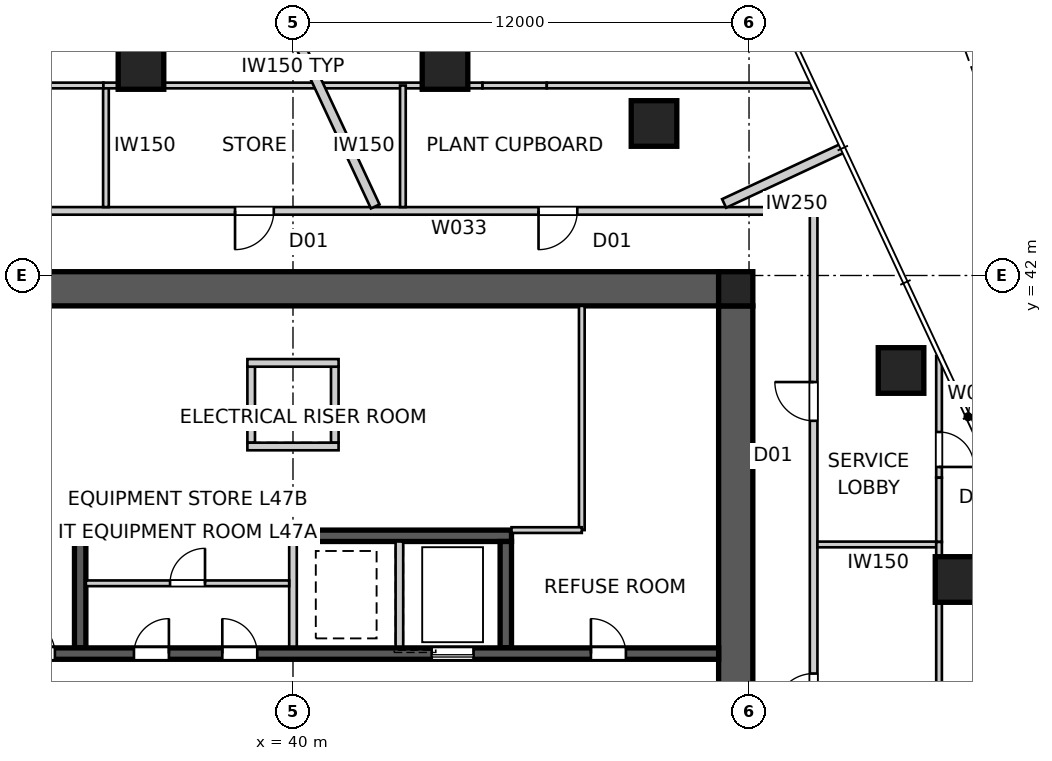
"""IFC4 building model, lengths in metres.
Left out: names, types, materials, properties, quantities, classifications, styles, units other than length and angle.
Written with IfcOpenShell. Run it as: python <this file> out.ifc"""

import sys

from ifc_helpers import new_model, si_unit, direction, frame, frame_2d, origin, origin_2d, place, context, subcontext, project, spatial, polyline, rectangle, outline, extrude, element, fill, save


model = new_model("IFC4")
c1 = context("Model", 3, precision=1e-05, world=origin(), true_north=direction((0.0, 1.0)))
c2 = subcontext(c1, "Body", "Model", "MODEL_VIEW")
j1 = project(units=[si_unit("LENGTHUNIT", "METRE"), si_unit("PLANEANGLEUNIT", "RADIAN")], contexts=[c1])
p1 = place(None, origin())
s1 = spatial("IfcSite", under=j1, at=p1, CompositionType="ELEMENT")
p2 = place(p1, origin())
s2 = spatial("IfcBuilding", under=s1, at=p2, CompositionType="ELEMENT")
p3 = place(p2, frame((0.0, 0.0, 171.0)))
s3 = spatial("IfcBuildingStorey", under=s2, at=p3, CompositionType="ELEMENT", Elevation=171.0)
p4 = place(p3, frame((28.8, 41.65, 0.0), z_axis=(0.0, 0.0, 1.0), x_axis=(1.0, 0.0, 0.0)))
e1 = element("IfcWall", 1, at=p4, inside=s3, PredefinedType="SHEAR", context=c2, shape_type="SweptSolid", body=[
    extrude(outline(polyline([(0.0, -0.45), (22.4, -0.45), (22.4, -0.025), (22.85, -0.025), (22.85, 0.025), (22.4, 0.025), (22.4, 0.45), (0.0, 0.45), (0.0, 0.025), (-0.45, 0.025), (-0.45, -0.025), (0.0, -0.025), (0.0, -0.45)])), origin(), (0.0, 0.0, 1.0), 5.0),
])
p5 = place(p3, frame((51.65, 18.8, 0.0), z_axis=(0.0, 0.0, 1.0), x_axis=(0.0, 1.0, 0.0)))
e2 = element("IfcWall", 2, at=p5, inside=s3, PredefinedType="SHEAR", context=c2, shape_type="SweptSolid", body=[
    extrude(outline(polyline([(0.0, -0.45), (22.4, -0.45), (22.4, -0.025), (22.85, -0.025), (22.85, 0.025), (22.4, 0.025), (22.4, 0.45), (0.0, 0.45), (0.0, 0.025), (-0.45, 0.025), (-0.45, -0.025), (0.0, -0.025), (0.0, -0.45)])), origin(), (0.0, 0.0, 1.0), 5.0),
])
p6 = place(p5, frame((11.14, 0.0, 0.0)))
e3 = element("IfcOpeningElement", 3, at=p6, cuts=e2, PredefinedType="OPENING", context=c2, shape_type="SweptSolid", body=[
    extrude(rectangle(XDim=1.02, YDim=2.4, at=frame_2d((0.51, 1.2))), frame((0.0, 0.46, 0.0), z_axis=(0.0, -1.0, 0.0), x_axis=(1.0, 0.0, 0.0)), (0.0, 0.0, 1.0), 0.92),
])
p7 = place(p3, frame((28.8, 32.05, 0.0), z_axis=(0.0, 0.0, 1.0), x_axis=(1.0, 0.0, 0.0)))
e4 = element("IfcWall", 4, at=p7, inside=s3, PredefinedType="SHEAR", context=c2, shape_type="SweptSolid", body=[
    extrude(rectangle(XDim=22.4, YDim=0.3, at=frame_2d((11.2, 0.0))), origin(), (0.0, 0.0, 1.0), 5.0),
])
p8 = place(p7, frame((19.04, 0.0, 0.0)))
e5 = element("IfcOpeningElement", 5, at=p8, cuts=e4, PredefinedType="OPENING", context=c2, shape_type="SweptSolid", body=[
    extrude(rectangle(XDim=0.92, YDim=2.1, at=frame_2d((0.46, 1.05))), frame((0.0, 0.16, 0.0), z_axis=(0.0, -1.0, 0.0), x_axis=(1.0, 0.0, 0.0)), (0.0, 0.0, 1.0), 0.32),
])
p9 = place(p7, frame((1.265, 0.0, 0.0)))
e6 = element("IfcOpeningElement", 6, at=p9, cuts=e4, PredefinedType="OPENING", context=c2, shape_type="SweptSolid", body=[
    extrude(rectangle(XDim=1.02, YDim=2.1, at=frame_2d((0.51, 1.05))), frame((0.0, 0.16, 0.0), z_axis=(0.0, -1.0, 0.0), x_axis=(1.0, 0.0, 0.0)), (0.0, 0.0, 1.0), 0.32),
])
p10 = place(p7, frame((4.015, 0.0, 0.0)))
e7 = element("IfcOpeningElement", 7, at=p10, cuts=e4, PredefinedType="OPENING", context=c2, shape_type="SweptSolid", body=[
    extrude(rectangle(XDim=0.92, YDim=2.1, at=frame_2d((0.46, 1.05))), frame((0.0, 0.16, 0.0), z_axis=(0.0, -1.0, 0.0), x_axis=(1.0, 0.0, 0.0)), (0.0, 0.0, 1.0), 0.32),
])
p11 = place(p7, frame((7.015, 0.0, 0.0)))
e8 = element("IfcOpeningElement", 8, at=p11, cuts=e4, PredefinedType="OPENING", context=c2, shape_type="SweptSolid", body=[
    extrude(rectangle(XDim=0.92, YDim=2.1, at=frame_2d((0.46, 1.05))), frame((0.0, 0.16, 0.0), z_axis=(0.0, -1.0, 0.0), x_axis=(1.0, 0.0, 0.0)), (0.0, 0.0, 1.0), 0.32),
])
p12 = place(p7, frame((9.34, 0.0, 0.0)))
e9 = element("IfcOpeningElement", 9, at=p12, cuts=e4, PredefinedType="OPENING", context=c2, shape_type="SweptSolid", body=[
    extrude(rectangle(XDim=0.92, YDim=2.1, at=frame_2d((0.46, 1.05))), frame((0.0, 0.16, 0.0), z_axis=(0.0, -1.0, 0.0), x_axis=(1.0, 0.0, 0.0)), (0.0, 0.0, 1.0), 0.32),
])
p13 = place(p7, frame((14.85, 0.0, 0.0)))
e10 = element("IfcOpeningElement", 10, at=p13, cuts=e4, PredefinedType="OPENING", context=c2, shape_type="SweptSolid", body=[
    extrude(rectangle(XDim=1.1, YDim=2.1, at=frame_2d((0.55, 1.05))), frame((0.0, 0.16, 0.0), z_axis=(0.0, -1.0, 0.0), x_axis=(1.0, 0.0, 0.0)), (0.0, 0.0, 1.0), 0.32),
])
p14 = place(p3, frame((34.25, 35.15, 0.0), z_axis=(0.0, 0.0, 1.0), x_axis=(1.0, 0.0, 0.0)))
e11 = element("IfcWall", 11, at=p14, inside=s3, PredefinedType="SHEAR", context=c2, shape_type="SweptSolid", body=[
    extrude(rectangle(XDim=11.5, YDim=0.3, at=frame_2d((5.75, 0.0))), origin(), (0.0, 0.0, 1.0), 5.0),
])
p15 = place(p3, frame((34.4, 32.2, 0.0), z_axis=(0.0, 0.0, 1.0), x_axis=(0.0, 1.0, 0.0)))
e12 = element("IfcWall", 12, at=p15, inside=s3, PredefinedType="SHEAR", context=c2, shape_type="SweptSolid", body=[
    extrude(rectangle(XDim=2.8, YDim=0.3, at=frame_2d((1.4, 0.0))), origin(), (0.0, 0.0, 1.0), 5.0),
])
for number, where, z_axis, x_axis in (
    (13, (40.0, 32.2, 0.0), (0.0, 0.0, 1.0), (0.0, 1.0, 0.0)),
    (14, (42.8, 32.2, 0.0), (0.0, 0.0, 1.0), (0.0, 1.0, 0.0)),
):
    element("IfcWall", number, at=place(p3, frame(where, z_axis=z_axis, x_axis=x_axis)), inside=s3, PredefinedType="SOLIDWALL", context=c2, shape_type="SweptSolid", body=[
        extrude(rectangle(XDim=2.8, YDim=0.2, at=frame_2d((1.4, 0.0))), origin(), (0.0, 0.0, 1.0), 5.0),
    ])
p16 = place(p3, frame((45.6, 32.2, 0.0), z_axis=(0.0, 0.0, 1.0), x_axis=(0.0, 1.0, 0.0)))
e15 = element("IfcWall", 15, at=p16, inside=s3, PredefinedType="SHEAR", context=c2, shape_type="SweptSolid", body=[
    extrude(rectangle(XDim=2.8, YDim=0.3, at=frame_2d((1.4, 0.0))), origin(), (0.0, 0.0, 1.0), 5.0),
])
for number, where, z_axis, x_axis in (
    (16, (38.9, 37.6, 0.0), (0.0, 0.0, 1.0), (0.0, 1.0, 0.0)),
    (17, (41.1, 37.6, 0.0), (0.0, 0.0, 1.0), (0.0, 1.0, 0.0)),
):
    element("IfcWall", number, at=place(p3, frame(where, z_axis=z_axis, x_axis=x_axis)), inside=s3, PredefinedType="SOLIDWALL", context=c2, shape_type="SweptSolid", body=[
        extrude(rectangle(XDim=2.0, YDim=0.2, at=frame_2d((1.0, 0.0))), origin(), (0.0, 0.0, 1.0), 5.0),
    ])
for number, where, z_axis, x_axis in (
    (18, (38.8, 37.5, 0.0), (0.0, 0.0, 1.0), (1.0, 0.0, 0.0)),
    (19, (38.8, 39.7, 0.0), (0.0, 0.0, 1.0), (1.0, 0.0, 0.0)),
):
    element("IfcWall", number, at=place(p3, frame(where, z_axis=z_axis, x_axis=x_axis)), inside=s3, PredefinedType="SOLIDWALL", context=c2, shape_type="SweptSolid", body=[
        extrude(rectangle(XDim=2.4, YDim=0.2, at=frame_2d((1.2, 0.0))), origin(), (0.0, 0.0, 1.0), 5.0),
    ])
p17 = place(p3, frame((51.65, 41.65, 0.0), z_axis=(0.0, 0.0, 1.0), x_axis=(1.0, 0.0, 0.0)))
e20 = element("IfcColumn", 20, at=p17, inside=s3, PredefinedType="COLUMN", context=c2, shape_type="SweptSolid", body=[
    extrude(rectangle(XDim=0.9, YDim=0.9, at=origin_2d()), origin(), (0.0, 0.0, 1.0), 5.0),
])
for number, where, z_axis, x_axis in (
    (21, (57.5, 34.0, 0.0), (0.0, 0.0, 1.0), (1.0, 0.0, 0.0)),
    (22, (56.0, 39.5, 0.0), (0.0, 0.0, 1.0), (1.0, 0.0, 0.0)),
    (23, (49.5, 46.0, 0.0), (0.0, 0.0, 1.0), (1.0, 0.0, 0.0)),
    (24, (44.0, 47.5, 0.0), (0.0, 0.0, 1.0), (1.0, 0.0, 0.0)),
    (25, (36.0, 47.5, 0.0), (0.0, 0.0, 1.0), (1.0, 0.0, 0.0)),
):
    element("IfcColumn", number, at=place(p3, frame(where, z_axis=z_axis, x_axis=x_axis)), inside=s3, PredefinedType="COLUMN", context=c2, shape_type="SweptSolid", body=[
        extrude(rectangle(XDim=1.2, YDim=1.2, at=origin_2d()), origin(), (0.0, 0.0, 1.0), 5.0),
    ])
p18 = place(p3, frame((53.7, 16.0, 0.0), z_axis=(0.0, 0.0, 1.0), x_axis=(0.0, 1.0, 0.0)))
e26 = element("IfcWall", 26, at=p18, inside=s3, PredefinedType="PARTITIONING", context=c2, shape_type="SweptSolid", body=[
    extrude(rectangle(XDim=27.7, YDim=0.2, at=frame_2d((13.85, 0.0))), origin(), (0.0, 0.0, 1.0), 4.85),
])
p19 = place(p18, frame((22.176, 0.0, 0.0)))
e27 = element("IfcOpeningElement", 27, at=p19, cuts=e26, PredefinedType="OPENING", context=c2, shape_type="SweptSolid", body=[
    extrude(rectangle(XDim=1.02, YDim=2.34, at=frame_2d((0.51, 1.17))), frame((0.0, 0.11, 0.0), z_axis=(0.0, -1.0, 0.0), x_axis=(1.0, 0.0, 0.0)), (0.0, 0.0, 1.0), 0.22),
])
p20 = place(p18, frame((6.519, 0.0, 0.0)))
e28 = element("IfcOpeningElement", 28, at=p20, cuts=e26, PredefinedType="OPENING", context=c2, shape_type="SweptSolid", body=[
    extrude(rectangle(XDim=1.02, YDim=2.34, at=frame_2d((0.51, 1.17))), frame((0.0, 0.11, 0.0), z_axis=(0.0, -1.0, 0.0), x_axis=(1.0, 0.0, 0.0)), (0.0, 0.0, 1.0), 0.22),
])
p21 = place(p18, frame((14.505, 0.0, 0.0)))
e29 = element("IfcOpeningElement", 29, at=p21, cuts=e26, PredefinedType="OPENING", context=c2, shape_type="SweptSolid", body=[
    extrude(rectangle(XDim=1.02, YDim=2.34, at=frame_2d((0.51, 1.17))), frame((0.0, 0.11, 0.0), z_axis=(0.0, -1.0, 0.0), x_axis=(1.0, 0.0, 0.0)), (0.0, 0.0, 1.0), 0.22),
])
p22 = place(p3, frame((53.7, 43.7, 0.0), z_axis=(0.0, 0.0, 1.0), x_axis=(-1.0, 0.0, 0.0)))
e30 = element("IfcWall", 30, at=p22, inside=s3, PredefinedType="PARTITIONING", context=c2, shape_type="SweptSolid", body=[
    extrude(rectangle(XDim=27.4, YDim=0.2, at=frame_2d((13.7, 0.0))), origin(), (0.0, 0.0, 1.0), 4.85),
])
p23 = place(p22, frame((21.876, 0.0, 0.0)))
e31 = element("IfcOpeningElement", 31, at=p23, cuts=e30, PredefinedType="OPENING", context=c2, shape_type="SweptSolid", body=[
    extrude(rectangle(XDim=1.02, YDim=2.34, at=frame_2d((0.51, 1.17))), frame((0.0, 0.11, 0.0), z_axis=(0.0, -1.0, 0.0), x_axis=(1.0, 0.0, 0.0)), (0.0, 0.0, 1.0), 0.22),
])
p24 = place(p22, frame((6.219, 0.0, 0.0)))
e32 = element("IfcOpeningElement", 32, at=p24, cuts=e30, PredefinedType="OPENING", context=c2, shape_type="SweptSolid", body=[
    extrude(rectangle(XDim=1.02, YDim=2.34, at=frame_2d((0.51, 1.17))), frame((0.0, 0.11, 0.0), z_axis=(0.0, -1.0, 0.0), x_axis=(1.0, 0.0, 0.0)), (0.0, 0.0, 1.0), 0.22),
])
p25 = place(p22, frame((14.205, 0.0, 0.0)))
e33 = element("IfcOpeningElement", 33, at=p25, cuts=e30, PredefinedType="OPENING", context=c2, shape_type="SweptSolid", body=[
    extrude(rectangle(XDim=1.02, YDim=2.34, at=frame_2d((0.51, 1.17))), frame((0.0, 0.11, 0.0), z_axis=(0.0, -1.0, 0.0), x_axis=(1.0, 0.0, 0.0)), (0.0, 0.0, 1.0), 0.22),
])
p26 = place(p3, frame((61.06, 31.214, 0.0), z_axis=(0.0, 0.0, 1.0), x_axis=(-0.906306405344, -0.422621224778, 0.0)))
e34 = element("IfcWall", 34, at=p26, inside=s3, PredefinedType="PARTITIONING", context=c2, shape_type="SweptSolid", body=[
    extrude(rectangle(XDim=7.992, YDim=0.25, at=frame_2d((3.996, 0.0))), origin(), (0.0, 0.0, 1.0), 4.85),
])
p27 = place(p3, frame((54.467, 45.353, 0.0), z_axis=(0.0, 0.0, 1.0), x_axis=(-0.906322475905, -0.422586759932, 0.0)))
e35 = element("IfcWall", 35, at=p27, inside=s3, PredefinedType="PARTITIONING", context=c2, shape_type="SweptSolid", body=[
    extrude(rectangle(XDim=3.446, YDim=0.25, at=frame_2d((1.723, 0.0))), origin(), (0.0, 0.0, 1.0), 4.85),
])
p28 = place(p3, frame((38.786, 51.06, 0.0), z_axis=(0.0, 0.0, 1.0), x_axis=(0.422621224778, -0.906306405344, 0.0)))
e36 = element("IfcWall", 36, at=p28, inside=s3, PredefinedType="PARTITIONING", context=c2, shape_type="SweptSolid", body=[
    extrude(rectangle(XDim=7.992, YDim=0.25, at=frame_2d((3.996, 0.0))), origin(), (0.0, 0.0, 1.0), 4.85),
])
p29 = place(p3, frame((47.6, 41.2, 0.0), z_axis=(0.0, 0.0, 1.0), x_axis=(0.0, -1.0, 0.0)))
e37 = element("IfcWall", 37, at=p29, inside=s3, PredefinedType="SOLIDWALL", context=c2, shape_type="SweptSolid", body=[
    extrude(rectangle(XDim=5.9, YDim=0.15, at=frame_2d((2.95, 0.0))), origin(), (0.0, 0.0, 1.0), 4.85),
])
p30 = place(p3, frame((47.6, 35.3, 0.0), z_axis=(0.0, 0.0, 1.0), x_axis=(-1.0, 0.0, 0.0)))
e38 = element("IfcWall", 38, at=p30, inside=s3, PredefinedType="SOLIDWALL", context=c2, shape_type="SweptSolid", body=[
    extrude(rectangle(XDim=1.85, YDim=0.15, at=frame_2d((0.925, 0.0))), origin(), (0.0, 0.0, 1.0), 4.85),
])
p31 = place(p3, frame((57.0, 34.922, 0.0), z_axis=(0.0, 0.0, 1.0), x_axis=(-1.0, 0.0, 0.0)))
e39 = element("IfcWall", 39, at=p31, inside=s3, PredefinedType="SOLIDWALL", context=c2, shape_type="SweptSolid", body=[
    extrude(rectangle(XDim=3.2, YDim=0.15, at=frame_2d((1.6, 0.0))), origin(), (0.0, 0.0, 1.0), 4.85),
])
p32 = place(p3, frame((57.0, 39.881, 0.0), z_axis=(0.0, 0.0, 1.0), x_axis=(0.0, -1.0, 0.0)))
e40 = element("IfcWall", 40, at=p32, inside=s3, PredefinedType="SOLIDWALL", context=c2, shape_type="SweptSolid", body=[
    extrude(rectangle(XDim=3.202, YDim=0.15, at=frame_2d((1.601, 0.0))), origin(), (0.0, 0.0, 1.0), 4.85),
])
p33 = place(p32, frame((2.0, 0.0, 0.0)))
e41 = element("IfcOpeningElement", 41, at=p33, cuts=e40, PredefinedType="OPENING", context=c2, shape_type="SweptSolid", body=[
    extrude(rectangle(XDim=0.92, YDim=2.1, at=frame_2d((0.46, 1.05))), frame((0.0, 0.085, 0.0), z_axis=(0.0, -1.0, 0.0), x_axis=(1.0, 0.0, 0.0)), (0.0, 0.0, 1.0), 0.17),
])
p34 = place(p3, frame((57.0, 36.678, 0.0), z_axis=(0.0, 0.0, 1.0), x_axis=(0.0, -1.0, 0.0)))
e42 = element("IfcWall", 42, at=p34, inside=s3, PredefinedType="SOLIDWALL", context=c2, shape_type="SweptSolid", body=[
    extrude(rectangle(XDim=1.69, YDim=0.15, at=frame_2d((0.845, 0.0))), origin(), (0.0, 0.0, 1.0), 3.85),
])
p35 = place(p3, frame((57.0, 34.988, 0.0), z_axis=(0.0, 0.0, 1.0), x_axis=(0.0, -1.0, 0.0)))
e43 = element("IfcWall", 43, at=p35, inside=s3, PredefinedType="SOLIDWALL", context=c2, shape_type="SweptSolid", body=[
    extrude(rectangle(XDim=9.977, YDim=0.15, at=frame_2d((4.988, 0.0))), origin(), (0.0, 0.0, 1.0), 4.85),
])
p36 = place(p3, frame((35.078, 47.0, 0.0), z_axis=(0.0, 0.0, 1.0), x_axis=(0.0, -1.0, 0.0)))
e44 = element("IfcWall", 44, at=p36, inside=s3, PredefinedType="SOLIDWALL", context=c2, shape_type="SweptSolid", body=[
    extrude(rectangle(XDim=3.2, YDim=0.15, at=frame_2d((1.6, 0.0))), origin(), (0.0, 0.0, 1.0), 4.85),
])
p37 = place(p3, frame((33.322, 47.0, 0.0), z_axis=(0.0, 0.0, 1.0), x_axis=(1.0, 0.0, 0.0)))
e45 = element("IfcWall", 45, at=p37, inside=s3, PredefinedType="SOLIDWALL", context=c2, shape_type="SweptSolid", body=[
    extrude(rectangle(XDim=1.69, YDim=0.15, at=frame_2d((0.845, 0.0))), origin(), (0.0, 0.0, 1.0), 3.85),
])
p38 = place(p3, frame((35.012, 47.0, 0.0), z_axis=(0.0, 0.0, 1.0), x_axis=(1.0, 0.0, 0.0)))
e46 = element("IfcWall", 46, at=p38, inside=s3, PredefinedType="SOLIDWALL", context=c2, shape_type="SweptSolid", body=[
    extrude(rectangle(XDim=9.977, YDim=0.15, at=frame_2d((4.988, 0.0))), origin(), (0.0, 0.0, 1.0), 4.85),
])
p39 = place(p3, frame((44.988, 47.0, 0.0), z_axis=(0.0, 0.0, 1.0), x_axis=(1.0, 0.0, 0.0)))
e47 = element("IfcWall", 47, at=p39, inside=s3, PredefinedType="SOLIDWALL", context=c2, shape_type="SweptSolid", body=[
    extrude(rectangle(XDim=1.69, YDim=0.15, at=frame_2d((0.845, 0.0))), origin(), (0.0, 0.0, 1.0), 3.85),
])
p40 = place(p3, frame((46.678, 47.0, 0.0), z_axis=(0.0, 0.0, 1.0), x_axis=(1.0, 0.0, 0.0)))
e48 = element("IfcWall", 48, at=p40, inside=s3, PredefinedType="SOLIDWALL", context=c2, shape_type="SweptSolid", body=[
    extrude(rectangle(XDim=6.976, YDim=0.15, at=frame_2d((3.488, 0.0))), origin(), (0.0, 0.0, 1.0), 4.85),
])
p41 = place(p3, frame((42.892, 43.8, 0.0), z_axis=(0.0, 0.0, 1.0), x_axis=(0.0, 1.0, 0.0)))
e49 = element("IfcWall", 49, at=p41, inside=s3, PredefinedType="SOLIDWALL", context=c2, shape_type="SweptSolid", body=[
    extrude(rectangle(XDim=3.2, YDim=0.15, at=frame_2d((1.6, 0.0))), origin(), (0.0, 0.0, 1.0), 4.322),
])
p42 = place(p3, frame((34.55, 33.9, 0.0), z_axis=(0.0, 0.0, 1.0), x_axis=(1.0, 0.0, 0.0)))
e50 = element("IfcWall", 50, at=p42, inside=s3, PredefinedType="SOLIDWALL", context=c2, shape_type="SweptSolid", body=[
    extrude(rectangle(XDim=5.35, YDim=0.15, at=frame_2d((2.675, 0.0))), origin(), (0.0, 0.0, 1.0), 4.85),
])
p43 = place(p42, frame((2.215, 0.0, 0.0)))
e51 = element("IfcOpeningElement", 51, at=p43, cuts=e50, PredefinedType="OPENING", context=c2, shape_type="SweptSolid", body=[
    extrude(rectangle(XDim=0.92, YDim=2.1, at=frame_2d((0.46, 1.05))), frame((0.0, 0.085, 0.0), z_axis=(0.0, -1.0, 0.0), x_axis=(1.0, 0.0, 0.0)), (0.0, 0.0, 1.0), 0.17),
])
p44 = place(p8, origin())
e52 = element("IfcDoor", 52, at=p44, inside=s3, OperationType="SINGLE_SWING_LEFT", PredefinedType="DOOR", context=c2, shape_type="SweptSolid", body=[
    extrude(rectangle(XDim=0.92, YDim=2.1, at=frame_2d((0.46, 1.05))), frame((0.0, 0.025, 0.0), z_axis=(0.0, -1.0, 0.0), x_axis=(1.0, 0.0, 0.0)), (0.0, 0.0, 1.0), 0.05),
])
fill(e5, e52)
p45 = place(p10, origin())
e53 = element("IfcDoor", 53, at=p45, inside=s3, OperationType="SINGLE_SWING_LEFT", PredefinedType="DOOR", context=c2, shape_type="SweptSolid", body=[
    extrude(rectangle(XDim=0.92, YDim=2.1, at=frame_2d((0.46, 1.05))), frame((0.0, 0.025, 0.0), z_axis=(0.0, -1.0, 0.0), x_axis=(1.0, 0.0, 0.0)), (0.0, 0.0, 1.0), 0.05),
])
fill(e7, e53)
p46 = place(p19, origin())
e54 = element("IfcDoor", 54, at=p46, inside=s3, OperationType="SINGLE_SWING_RIGHT", PredefinedType="DOOR", context=c2, shape_type="SweptSolid", body=[
    extrude(rectangle(XDim=1.02, YDim=2.34, at=frame_2d((0.51, 1.17))), frame((0.0, 0.025, 0.0), z_axis=(0.0, -1.0, 0.0), x_axis=(1.0, 0.0, 0.0)), (0.0, 0.0, 1.0), 0.05),
])
fill(e27, e54)
p47 = place(p24, origin())
e55 = element("IfcDoor", 55, at=p47, inside=s3, OperationType="SINGLE_SWING_RIGHT", PredefinedType="DOOR", context=c2, shape_type="SweptSolid", body=[
    extrude(rectangle(XDim=1.02, YDim=2.34, at=frame_2d((0.51, 1.17))), frame((0.0, 0.025, 0.0), z_axis=(0.0, -1.0, 0.0), x_axis=(1.0, 0.0, 0.0)), (0.0, 0.0, 1.0), 0.05),
])
fill(e32, e55)
p48 = place(p21, origin())
e56 = element("IfcDoor", 56, at=p48, inside=s3, OperationType="SINGLE_SWING_LEFT", PredefinedType="DOOR", context=c2, shape_type="SweptSolid", body=[
    extrude(rectangle(XDim=1.02, YDim=2.34, at=frame_2d((0.51, 1.17))), frame((0.0, 0.025, 0.0), z_axis=(0.0, -1.0, 0.0), x_axis=(1.0, 0.0, 0.0)), (0.0, 0.0, 1.0), 0.05),
])
fill(e29, e56)
p49 = place(p25, origin())
e57 = element("IfcDoor", 57, at=p49, inside=s3, OperationType="SINGLE_SWING_RIGHT", PredefinedType="DOOR", context=c2, shape_type="SweptSolid", body=[
    extrude(rectangle(XDim=1.02, YDim=2.34, at=frame_2d((0.51, 1.17))), frame((0.0, 0.025, 0.0), z_axis=(0.0, -1.0, 0.0), x_axis=(1.0, 0.0, 0.0)), (0.0, 0.0, 1.0), 0.05),
])
fill(e33, e57)
p50 = place(p33, origin())
e58 = element("IfcDoor", 58, at=p50, inside=s3, OperationType="SINGLE_SWING_RIGHT", PredefinedType="DOOR", context=c2, shape_type="SweptSolid", body=[
    extrude(rectangle(XDim=0.92, YDim=2.1, at=frame_2d((0.46, 1.05))), frame((0.0, 0.025, 0.0), z_axis=(0.0, -1.0, 0.0), x_axis=(1.0, 0.0, 0.0)), (0.0, 0.0, 1.0), 0.05),
])
fill(e41, e58)
p51 = place(p11, origin())
e59 = element("IfcDoor", 59, at=p51, inside=s3, OperationType="SINGLE_SWING_RIGHT", PredefinedType="DOOR", context=c2, shape_type="SweptSolid", body=[
    extrude(rectangle(XDim=0.92, YDim=2.1, at=frame_2d((0.46, 1.05))), frame((0.0, 0.025, 0.0), z_axis=(0.0, -1.0, 0.0), x_axis=(1.0, 0.0, 0.0)), (0.0, 0.0, 1.0), 0.05),
])
fill(e8, e59)
p52 = place(p12, origin())
e60 = element("IfcDoor", 60, at=p52, inside=s3, OperationType="SINGLE_SWING_LEFT", PredefinedType="DOOR", context=c2, shape_type="SweptSolid", body=[
    extrude(rectangle(XDim=0.92, YDim=2.1, at=frame_2d((0.46, 1.05))), frame((0.0, 0.025, 0.0), z_axis=(0.0, -1.0, 0.0), x_axis=(1.0, 0.0, 0.0)), (0.0, 0.0, 1.0), 0.05),
])
fill(e9, e60)
p53 = place(p43, origin())
e61 = element("IfcDoor", 61, at=p53, inside=s3, OperationType="SINGLE_SWING_RIGHT", PredefinedType="DOOR", context=c2, shape_type="SweptSolid", body=[
    extrude(rectangle(XDim=0.92, YDim=2.1, at=frame_2d((0.46, 1.05))), frame((0.0, 0.025, 0.0), z_axis=(0.0, -1.0, 0.0), x_axis=(1.0, 0.0, 0.0)), (0.0, 0.0, 1.0), 0.05),
])
fill(e51, e61)
p54 = place(p13, origin())
e62 = element("IfcDoor", 62, at=p54, inside=s3, OperationType="SLIDING_TO_LEFT", PredefinedType="DOOR", context=c2, shape_type="SweptSolid", body=[
    extrude(rectangle(XDim=1.1, YDim=2.1, at=frame_2d((0.55, 1.05))), frame((0.0, 0.025, 0.0), z_axis=(0.0, -1.0, 0.0), x_axis=(1.0, 0.0, 0.0)), (0.0, 0.0, 1.0), 0.05),
])
fill(e10, e62)
save(model, sys.argv[1])
